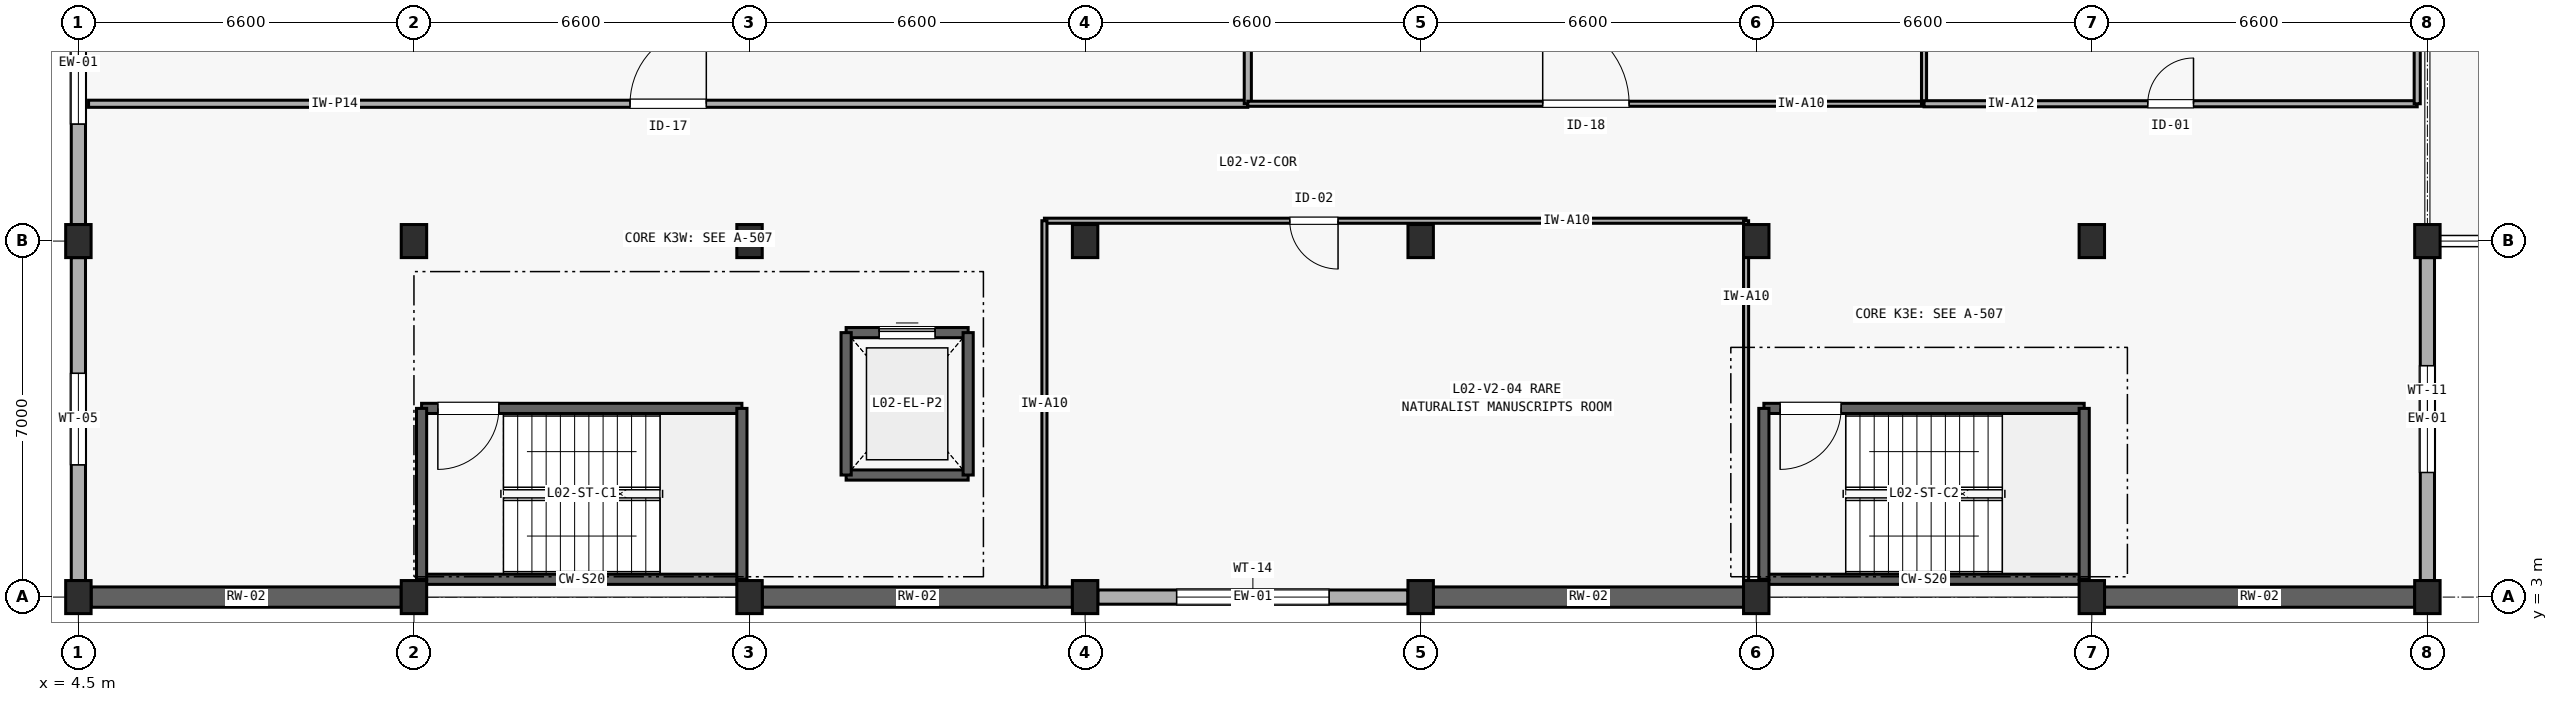
"""IFC4 building model, lengths in metres.
Left out: names, types, materials, properties, quantities, classifications, styles, units other than length and angle.
Written with IfcOpenShell. Run it as: python <this file> out.ifc"""

import sys

from ifc_helpers import new_model, si_unit, direction, frame, frame_2d, origin, origin_2d, place, context, subcontext, project, spatial, rectangle, extrude, element, fill, save


model = new_model("IFC4")
c1 = context("Model", 3, precision=1e-05, world=origin(), true_north=direction((0.0, 1.0)))
c2 = subcontext(c1, "Body", "Model", "MODEL_VIEW")
j1 = project(units=[si_unit("LENGTHUNIT", "METRE"), si_unit("PLANEANGLEUNIT", "RADIAN")], contexts=[c1])
p1 = place(None, origin())
s1 = spatial("IfcSite", under=j1, at=p1, CompositionType="ELEMENT")
p2 = place(p1, origin())
s2 = spatial("IfcBuilding", under=s1, at=p2, CompositionType="ELEMENT")
p3 = place(p2, frame((0.0, 0.0, 8.4)))
s3 = spatial("IfcBuildingStorey", under=s2, at=p3, CompositionType="ELEMENT", Elevation=8.4)
for number, where, z_axis, x_axis in (
    (1, (4.5, 3.0, 0.0), (0.0, 0.0, 1.0), (1.0, 0.0, 0.0)),
    (2, (4.5, 10.0, 0.0), (0.0, 0.0, 1.0), (1.0, 0.0, 0.0)),
    (3, (11.1, 3.0, 0.0), (0.0, 0.0, 1.0), (1.0, 0.0, 0.0)),
    (4, (11.1, 10.0, 0.0), (0.0, 0.0, 1.0), (1.0, 0.0, 0.0)),
    (5, (17.7, 3.0, 0.0), (0.0, 0.0, 1.0), (1.0, 0.0, 0.0)),
    (6, (17.7, 10.0, 0.0), (0.0, 0.0, 1.0), (1.0, 0.0, 0.0)),
    (7, (24.3, 3.0, 0.0), (0.0, 0.0, 1.0), (1.0, 0.0, 0.0)),
    (8, (24.3, 10.0, 0.0), (0.0, 0.0, 1.0), (1.0, 0.0, 0.0)),
    (9, (30.9, 3.0, 0.0), (0.0, 0.0, 1.0), (1.0, 0.0, 0.0)),
    (10, (30.9, 10.0, 0.0), (0.0, 0.0, 1.0), (1.0, 0.0, 0.0)),
    (11, (37.5, 3.0, 0.0), (0.0, 0.0, 1.0), (1.0, 0.0, 0.0)),
    (12, (37.5, 10.0, 0.0), (0.0, 0.0, 1.0), (1.0, 0.0, 0.0)),
    (13, (44.1, 3.0, 0.0), (0.0, 0.0, 1.0), (1.0, 0.0, 0.0)),
    (14, (44.1, 10.0, 0.0), (0.0, 0.0, 1.0), (1.0, 0.0, 0.0)),
    (15, (50.7, 3.0, 0.0), (0.0, 0.0, 1.0), (1.0, 0.0, 0.0)),
    (16, (50.7, 10.0, 0.0), (0.0, 0.0, 1.0), (1.0, 0.0, 0.0)),
):
    element("IfcColumn", number, at=place(p3, frame(where, z_axis=z_axis, x_axis=x_axis)), inside=s3, PredefinedType="COLUMN", context=c2, shape_type="SweptSolid", body=[
        extrude(rectangle(XDim=0.5, YDim=0.65, at=origin_2d()), origin(), (0.0, 0.0, 1.0), 4.2),
    ])
for number, where, z_axis, x_axis in (
    (17, (4.75, 3.0, 0.0), (0.0, 0.0, 1.0), (1.0, 0.0, 0.0)),
    (18, (17.95, 3.0, 0.0), (0.0, 0.0, 1.0), (1.0, 0.0, 0.0)),
):
    element("IfcWall", number, at=place(p3, frame(where, z_axis=z_axis, x_axis=x_axis)), inside=s3, PredefinedType="SHEAR", context=c2, shape_type="SweptSolid", body=[
        extrude(rectangle(XDim=6.1, YDim=0.4, at=frame_2d((3.05, 0.0))), origin(), (0.0, 0.0, 1.0), 3.85),
    ])
p4 = place(p3, frame((24.55, 3.0, 0.0), z_axis=(0.0, 0.0, 1.0), x_axis=(1.0, 0.0, 0.0)))
e19 = element("IfcWall", 19, at=p4, inside=s3, PredefinedType="SOLIDWALL", context=c2, shape_type="SweptSolid", body=[
    extrude(rectangle(XDim=6.1, YDim=0.28, at=frame_2d((3.05, 0.0))), origin(), (0.0, 0.0, 1.0), 3.365),
])
p5 = place(p4, frame((1.55, 0.0, 0.85)))
e20 = element("IfcOpeningElement", 20, at=p5, cuts=e19, PredefinedType="OPENING", context=c2, shape_type="SweptSolid", body=[
    extrude(rectangle(XDim=3.0, YDim=1.5, at=frame_2d((1.5, 0.75))), frame((0.0, 0.15, 0.0), z_axis=(0.0, -1.0, 0.0), x_axis=(1.0, 0.0, 0.0)), (0.0, 0.0, 1.0), 0.3),
])
p6 = place(p3, frame((31.15, 3.0, 0.0), z_axis=(0.0, 0.0, 1.0), x_axis=(1.0, 0.0, 0.0)))
e21 = element("IfcWall", 21, at=p6, inside=s3, PredefinedType="SHEAR", context=c2, shape_type="SweptSolid", body=[
    extrude(rectangle(XDim=6.1, YDim=0.4, at=frame_2d((3.05, 0.0))), origin(), (0.0, 0.0, 1.0), 3.85),
])
p7 = place(p3, frame((44.35, 3.0, 0.0), z_axis=(0.0, 0.0, 1.0), x_axis=(1.0, 0.0, 0.0)))
e22 = element("IfcWall", 22, at=p7, inside=s3, PredefinedType="SHEAR", context=c2, shape_type="SweptSolid", body=[
    extrude(rectangle(XDim=6.1, YDim=0.4, at=frame_2d((3.05, 0.0))), origin(), (0.0, 0.0, 1.0), 3.85),
])
p8 = place(p3, frame((4.5, 3.325, 0.0), z_axis=(0.0, 0.0, 1.0), x_axis=(0.0, 1.0, 0.0)))
e23 = element("IfcWall", 23, at=p8, inside=s3, PredefinedType="SOLIDWALL", context=c2, shape_type="SweptSolid", body=[
    extrude(rectangle(XDim=6.35, YDim=0.28, at=frame_2d((3.175, 0.0))), origin(), (0.0, 0.0, 1.0), 3.505),
])
p9 = place(p8, frame((2.275, 0.0, 0.85)))
e24 = element("IfcOpeningElement", 24, at=p9, cuts=e23, PredefinedType="OPENING", context=c2, shape_type="SweptSolid", body=[
    extrude(rectangle(XDim=1.8, YDim=1.35, at=frame_2d((0.9, 0.675))), frame((0.0, 0.15, 0.0), z_axis=(0.0, -1.0, 0.0), x_axis=(1.0, 0.0, 0.0)), (0.0, 0.0, 1.0), 0.3),
])
p10 = place(p3, frame((4.5, 10.325, 0.0), z_axis=(0.0, 0.0, 1.0), x_axis=(0.0, 1.0, 0.0)))
e25 = element("IfcWall", 25, at=p10, inside=s3, PredefinedType="SOLIDWALL", context=c2, shape_type="SweptSolid", body=[
    extrude(rectangle(XDim=6.35, YDim=0.28, at=frame_2d((3.175, 0.0))), origin(), (0.0, 0.0, 1.0), 3.505),
])
p11 = place(p10, frame((1.975, 0.0, 0.85)))
e26 = element("IfcOpeningElement", 26, at=p11, cuts=e25, PredefinedType="OPENING", context=c2, shape_type="SweptSolid", body=[
    extrude(rectangle(XDim=2.4, YDim=1.35, at=frame_2d((1.2, 0.675))), frame((0.0, 0.15, 0.0), z_axis=(0.0, -1.0, 0.0), x_axis=(1.0, 0.0, 0.0)), (0.0, 0.0, 1.0), 0.3),
])
p12 = place(p3, frame((50.7, 3.325, 0.0), z_axis=(0.0, 0.0, 1.0), x_axis=(0.0, 1.0, 0.0)))
e27 = element("IfcWall", 27, at=p12, inside=s3, PredefinedType="SOLIDWALL", context=c2, shape_type="SweptSolid", body=[
    extrude(rectangle(XDim=6.35, YDim=0.28, at=frame_2d((3.175, 0.0))), origin(), (0.0, 0.0, 1.0), 3.565),
])
p13 = place(p12, frame((2.125, 0.0, 0.85)))
e28 = element("IfcOpeningElement", 28, at=p13, cuts=e27, PredefinedType="OPENING", context=c2, shape_type="SweptSolid", body=[
    extrude(rectangle(XDim=2.1, YDim=1.5, at=frame_2d((1.05, 0.75))), frame((0.0, 0.15, 0.0), z_axis=(0.0, -1.0, 0.0), x_axis=(1.0, 0.0, 0.0)), (0.0, 0.0, 1.0), 0.3),
])
p14 = place(p3, frame((11.25, 3.35, 0.0), z_axis=(0.0, 0.0, 1.0), x_axis=(1.0, 0.0, 0.0)))
e29 = element("IfcWall", 29, at=p14, inside=s3, PredefinedType="SHEAR", context=c2, shape_type="SweptSolid", body=[
    extrude(rectangle(XDim=6.3, YDim=0.2, at=frame_2d((3.15, 0.0))), origin(), (0.0, 0.0, 1.0), 4.2),
])
p15 = place(p3, frame((11.25, 6.71, 0.0), z_axis=(0.0, 0.0, 1.0), x_axis=(1.0, 0.0, 0.0)))
e30 = element("IfcWall", 30, at=p15, inside=s3, PredefinedType="SHEAR", context=c2, shape_type="SweptSolid", body=[
    extrude(rectangle(XDim=6.3, YDim=0.2, at=frame_2d((3.15, 0.0))), origin(), (0.0, 0.0, 1.0), 4.2),
])
p16 = place(p15, frame((0.32, 0.0, 0.0)))
e31 = element("IfcOpeningElement", 31, at=p16, cuts=e30, PredefinedType="OPENING", context=c2, shape_type="SweptSolid", body=[
    extrude(rectangle(XDim=1.2, YDim=2.15, at=frame_2d((0.6, 1.075))), frame((0.0, 0.11, 0.0), z_axis=(0.0, -1.0, 0.0), x_axis=(1.0, 0.0, 0.0)), (0.0, 0.0, 1.0), 0.22),
])
for number, where, z_axis, x_axis in (
    (32, (11.25, 3.35, 0.0), (0.0, 0.0, 1.0), (0.0, 1.0, 0.0)),
    (33, (17.55, 3.35, 0.0), (0.0, 0.0, 1.0), (0.0, 1.0, 0.0)),
):
    element("IfcWall", number, at=place(p3, frame(where, z_axis=z_axis, x_axis=x_axis)), inside=s3, PredefinedType="SHEAR", context=c2, shape_type="SweptSolid", body=[
        extrude(rectangle(XDim=3.36, YDim=0.2, at=frame_2d((1.68, 0.0))), origin(), (0.0, 0.0, 1.0), 4.2),
    ])
p17 = place(p3, frame((37.65, 3.35, 0.0), z_axis=(0.0, 0.0, 1.0), x_axis=(1.0, 0.0, 0.0)))
e34 = element("IfcWall", 34, at=p17, inside=s3, PredefinedType="SHEAR", context=c2, shape_type="SweptSolid", body=[
    extrude(rectangle(XDim=6.3, YDim=0.2, at=frame_2d((3.15, 0.0))), origin(), (0.0, 0.0, 1.0), 4.2),
])
p18 = place(p3, frame((37.65, 6.71, 0.0), z_axis=(0.0, 0.0, 1.0), x_axis=(1.0, 0.0, 0.0)))
e35 = element("IfcWall", 35, at=p18, inside=s3, PredefinedType="SHEAR", context=c2, shape_type="SweptSolid", body=[
    extrude(rectangle(XDim=6.3, YDim=0.2, at=frame_2d((3.15, 0.0))), origin(), (0.0, 0.0, 1.0), 4.2),
])
p19 = place(p18, frame((0.32, 0.0, 0.0)))
e36 = element("IfcOpeningElement", 36, at=p19, cuts=e35, PredefinedType="OPENING", context=c2, shape_type="SweptSolid", body=[
    extrude(rectangle(XDim=1.2, YDim=2.15, at=frame_2d((0.6, 1.075))), frame((0.0, 0.11, 0.0), z_axis=(0.0, -1.0, 0.0), x_axis=(1.0, 0.0, 0.0)), (0.0, 0.0, 1.0), 0.22),
])
for number, where, z_axis, x_axis in (
    (37, (37.65, 3.35, 0.0), (0.0, 0.0, 1.0), (0.0, 1.0, 0.0)),
    (38, (43.95, 3.35, 0.0), (0.0, 0.0, 1.0), (0.0, 1.0, 0.0)),
):
    element("IfcWall", number, at=place(p3, frame(where, z_axis=z_axis, x_axis=x_axis)), inside=s3, PredefinedType="SHEAR", context=c2, shape_type="SweptSolid", body=[
        extrude(rectangle(XDim=3.36, YDim=0.2, at=frame_2d((1.68, 0.0))), origin(), (0.0, 0.0, 1.0), 4.2),
    ])
p20 = place(p3, frame((19.6, 5.4, 0.0), z_axis=(0.0, 0.0, 1.0), x_axis=(1.0, 0.0, 0.0)))
e39 = element("IfcWall", 39, at=p20, inside=s3, PredefinedType="SHEAR", context=c2, shape_type="SweptSolid", body=[
    extrude(rectangle(XDim=2.4, YDim=0.2, at=frame_2d((1.2, 0.0))), origin(), (0.0, 0.0, 1.0), 4.2),
])
p21 = place(p3, frame((19.6, 8.2, 0.0), z_axis=(0.0, 0.0, 1.0), x_axis=(1.0, 0.0, 0.0)))
e40 = element("IfcWall", 40, at=p21, inside=s3, PredefinedType="SHEAR", context=c2, shape_type="SweptSolid", body=[
    extrude(rectangle(XDim=2.4, YDim=0.2, at=frame_2d((1.2, 0.0))), origin(), (0.0, 0.0, 1.0), 4.2),
])
p22 = place(p21, frame((0.65, 0.0, 0.0)))
e41 = element("IfcOpeningElement", 41, at=p22, cuts=e40, PredefinedType="OPENING", context=c2, shape_type="SweptSolid", body=[
    extrude(rectangle(XDim=1.1, YDim=2.15, at=frame_2d((0.55, 1.075))), frame((0.0, 0.11, 0.0), z_axis=(0.0, -1.0, 0.0), x_axis=(1.0, 0.0, 0.0)), (0.0, 0.0, 1.0), 0.22),
])
for number, where, z_axis, x_axis in (
    (42, (19.6, 5.4, 0.0), (0.0, 0.0, 1.0), (0.0, 1.0, 0.0)),
    (43, (22.0, 5.4, 0.0), (0.0, 0.0, 1.0), (0.0, 1.0, 0.0)),
):
    element("IfcWall", number, at=place(p3, frame(where, z_axis=z_axis, x_axis=x_axis)), inside=s3, PredefinedType="SHEAR", context=c2, shape_type="SweptSolid", body=[
        extrude(rectangle(XDim=2.8, YDim=0.2, at=frame_2d((1.4, 0.0))), origin(), (0.0, 0.0, 1.0), 4.2),
    ])
p23 = place(p3, frame((4.7, 12.7, 0.0), z_axis=(0.0, 0.0, 1.0), x_axis=(1.0, 0.0, 0.0)))
e44 = element("IfcWall", 44, at=p23, inside=s3, PredefinedType="PLUMBINGWALL", context=c2, shape_type="SweptSolid", body=[
    extrude(rectangle(XDim=22.8, YDim=0.14, at=frame_2d((11.4, 0.0))), origin(), (0.0, 0.0, 1.0), 3.9),
])
p24 = place(p23, frame((10.65, 0.0, 0.0)))
e45 = element("IfcOpeningElement", 45, at=p24, cuts=e44, PredefinedType="OPENING", context=c2, shape_type="SweptSolid", body=[
    extrude(rectangle(XDim=1.5, YDim=2.15, at=frame_2d((0.75, 1.075))), frame((0.0, 0.08, 0.0), z_axis=(0.0, -1.0, 0.0), x_axis=(1.0, 0.0, 0.0)), (0.0, 0.0, 1.0), 0.16),
])
p25 = place(p3, frame((27.5, 12.7, 0.0), z_axis=(0.0, 0.0, 1.0), x_axis=(0.0, 1.0, 0.0)))
e46 = element("IfcWall", 46, at=p25, inside=s3, PredefinedType="PLUMBINGWALL", context=c2, shape_type="SweptSolid", body=[
    extrude(rectangle(XDim=11.1, YDim=0.14, at=frame_2d((5.55, 0.0))), origin(), (0.0, 0.0, 1.0), 3.521),
])
p26 = place(p3, frame((27.5, 12.7, 0.0), z_axis=(0.0, 0.0, 1.0), x_axis=(1.0, 0.0, 0.0)))
e47 = element("IfcWall", 47, at=p26, inside=s3, PredefinedType="PARTITIONING", context=c2, shape_type="SweptSolid", body=[
    extrude(rectangle(XDim=13.3, YDim=0.1, at=frame_2d((6.65, 0.0))), origin(), (0.0, 0.0, 1.0), 3.9),
])
p27 = place(p26, frame((5.8, 0.0, 0.0)))
e48 = element("IfcOpeningElement", 48, at=p27, cuts=e47, PredefinedType="OPENING", context=c2, shape_type="SweptSolid", body=[
    extrude(rectangle(XDim=1.7, YDim=2.2, at=frame_2d((0.85, 1.1))), frame((0.0, 0.06, 0.0), z_axis=(0.0, -1.0, 0.0), x_axis=(1.0, 0.0, 0.0)), (0.0, 0.0, 1.0), 0.12),
])
p28 = place(p3, frame((40.8, 12.7, 0.0), z_axis=(0.0, 0.0, 1.0), x_axis=(0.0, 1.0, 0.0)))
e49 = element("IfcWall", 49, at=p28, inside=s3, PredefinedType="PARTITIONING", context=c2, shape_type="SweptSolid", body=[
    extrude(rectangle(XDim=11.1, YDim=0.1, at=frame_2d((5.55, 0.0))), origin(), (0.0, 0.0, 1.0), 3.458),
])
p29 = place(p3, frame((40.8, 12.7, 0.0), z_axis=(0.0, 0.0, 1.0), x_axis=(1.0, 0.0, 0.0)))
e50 = element("IfcWall", 50, at=p29, inside=s3, PredefinedType="PARTITIONING", context=c2, shape_type="SweptSolid", body=[
    extrude(rectangle(XDim=9.7, YDim=0.12, at=frame_2d((4.85, 0.0))), origin(), (0.0, 0.0, 1.0), 3.9),
])
p30 = place(p29, frame((4.4, 0.0, 0.0)))
e51 = element("IfcOpeningElement", 51, at=p30, cuts=e50, PredefinedType="OPENING", context=c2, shape_type="SweptSolid", body=[
    extrude(rectangle(XDim=0.9, YDim=2.1, at=frame_2d((0.45, 1.05))), frame((0.0, 0.07, 0.0), z_axis=(0.0, -1.0, 0.0), x_axis=(1.0, 0.0, 0.0)), (0.0, 0.0, 1.0), 0.14),
])
p31 = place(p3, frame((50.5, 12.7, 0.0), z_axis=(0.0, 0.0, 1.0), x_axis=(0.0, 1.0, 0.0)))
e52 = element("IfcWall", 52, at=p31, inside=s3, PredefinedType="PARTITIONING", context=c2, shape_type="SweptSolid", body=[
    extrude(rectangle(XDim=11.1, YDim=0.12, at=frame_2d((5.55, 0.0))), origin(), (0.0, 0.0, 1.0), 3.485),
])
p32 = place(p3, frame((23.5, 10.4, 0.0), z_axis=(0.0, 0.0, 1.0), x_axis=(1.0, 0.0, 0.0)))
e53 = element("IfcWall", 53, at=p32, inside=s3, PredefinedType="PARTITIONING", context=c2, shape_type="SweptSolid", body=[
    extrude(rectangle(XDim=13.8, YDim=0.1, at=frame_2d((6.9, 0.0))), origin(), (0.0, 0.0, 1.0), 3.9),
])
p33 = place(p32, frame((4.825, 0.0, 0.0)))
e54 = element("IfcOpeningElement", 54, at=p33, cuts=e53, PredefinedType="OPENING", context=c2, shape_type="SweptSolid", body=[
    extrude(rectangle(XDim=0.95, YDim=2.1, at=frame_2d((0.475, 1.05))), frame((0.0, 0.06, 0.0), z_axis=(0.0, -1.0, 0.0), x_axis=(1.0, 0.0, 0.0)), (0.0, 0.0, 1.0), 0.12),
])
for number, where, z_axis, x_axis in (
    (55, (23.5, 3.2, 0.0), (0.0, 0.0, 1.0), (0.0, 1.0, 0.0)),
    (56, (37.3, 3.2, 0.0), (0.0, 0.0, 1.0), (0.0, 1.0, 0.0)),
):
    element("IfcWall", number, at=place(p3, frame(where, z_axis=z_axis, x_axis=x_axis)), inside=s3, PredefinedType="PARTITIONING", context=c2, shape_type="SweptSolid", body=[
        extrude(rectangle(XDim=7.2, YDim=0.1, at=frame_2d((3.6, 0.0))), origin(), (0.0, 0.0, 1.0), 3.9),
    ])
p34 = place(p5, origin())
e57 = element("IfcWindow", 57, at=p34, inside=s3, PartitioningType="SINGLE_PANEL", PredefinedType="WINDOW", context=c2, shape_type="SweptSolid", body=[
    extrude(rectangle(XDim=3.0, YDim=1.5, at=frame_2d((1.5, 0.75))), frame((0.0, 0.03, 0.0), z_axis=(0.0, -1.0, 0.0), x_axis=(1.0, 0.0, 0.0)), (0.0, 0.0, 1.0), 0.06),
])
fill(e20, e57)
p35 = place(p9, origin())
e58 = element("IfcWindow", 58, at=p35, inside=s3, PartitioningType="SINGLE_PANEL", PredefinedType="WINDOW", context=c2, shape_type="SweptSolid", body=[
    extrude(rectangle(XDim=1.8, YDim=1.35, at=frame_2d((0.9, 0.675))), frame((0.0, 0.03, 0.0), z_axis=(0.0, -1.0, 0.0), x_axis=(1.0, 0.0, 0.0)), (0.0, 0.0, 1.0), 0.06),
])
fill(e24, e58)
p36 = place(p11, origin())
e59 = element("IfcWindow", 59, at=p36, inside=s3, PartitioningType="SINGLE_PANEL", PredefinedType="WINDOW", context=c2, shape_type="SweptSolid", body=[
    extrude(rectangle(XDim=2.4, YDim=1.35, at=frame_2d((1.2, 0.675))), frame((0.0, 0.03, 0.0), z_axis=(0.0, -1.0, 0.0), x_axis=(1.0, 0.0, 0.0)), (0.0, 0.0, 1.0), 0.06),
])
fill(e26, e59)
p37 = place(p13, origin())
e60 = element("IfcWindow", 60, at=p37, inside=s3, PartitioningType="SINGLE_PANEL", PredefinedType="WINDOW", context=c2, shape_type="SweptSolid", body=[
    extrude(rectangle(XDim=2.1, YDim=1.5, at=frame_2d((1.05, 0.75))), frame((0.0, 0.03, 0.0), z_axis=(0.0, -1.0, 0.0), x_axis=(1.0, 0.0, 0.0)), (0.0, 0.0, 1.0), 0.06),
])
fill(e28, e60)
p38 = place(p16, frame((1.2, 0.0, 0.0), z_axis=(0.0, 0.0, 1.0), x_axis=(-1.0, 0.0, 0.0)))
e61 = element("IfcDoor", 61, at=p38, inside=s3, OperationType="SINGLE_SWING_RIGHT", PredefinedType="DOOR", context=c2, shape_type="SweptSolid", body=[
    extrude(rectangle(XDim=1.2, YDim=2.15, at=frame_2d((0.6, 1.075))), frame((0.0, 0.025, 0.0), z_axis=(0.0, -1.0, 0.0), x_axis=(1.0, 0.0, 0.0)), (0.0, 0.0, 1.0), 0.05),
])
fill(e31, e61)
p39 = place(p19, frame((1.2, 0.0, 0.0), z_axis=(0.0, 0.0, 1.0), x_axis=(-1.0, 0.0, 0.0)))
e62 = element("IfcDoor", 62, at=p39, inside=s3, OperationType="SINGLE_SWING_RIGHT", PredefinedType="DOOR", context=c2, shape_type="SweptSolid", body=[
    extrude(rectangle(XDim=1.2, YDim=2.15, at=frame_2d((0.6, 1.075))), frame((0.0, 0.025, 0.0), z_axis=(0.0, -1.0, 0.0), x_axis=(1.0, 0.0, 0.0)), (0.0, 0.0, 1.0), 0.05),
])
fill(e36, e62)
p40 = place(p22, origin())
e63 = element("IfcDoor", 63, at=p40, inside=s3, OperationType="SLIDING_TO_LEFT", PredefinedType="DOOR", context=c2, shape_type="SweptSolid", body=[
    extrude(rectangle(XDim=1.1, YDim=2.15, at=frame_2d((0.55, 1.075))), frame((0.0, 0.025, 0.0), z_axis=(0.0, -1.0, 0.0), x_axis=(1.0, 0.0, 0.0)), (0.0, 0.0, 1.0), 0.05),
])
fill(e41, e63)
p41 = place(p24, origin())
e64 = element("IfcDoor", 64, at=p41, inside=s3, OperationType="SINGLE_SWING_RIGHT", PredefinedType="DOOR", context=c2, shape_type="SweptSolid", body=[
    extrude(rectangle(XDim=1.5, YDim=2.15, at=frame_2d((0.75, 1.075))), frame((0.0, 0.025, 0.0), z_axis=(0.0, -1.0, 0.0), x_axis=(1.0, 0.0, 0.0)), (0.0, 0.0, 1.0), 0.05),
])
fill(e45, e64)
p42 = place(p27, origin())
e65 = element("IfcDoor", 65, at=p42, inside=s3, OperationType="SINGLE_SWING_LEFT", PredefinedType="DOOR", context=c2, shape_type="SweptSolid", body=[
    extrude(rectangle(XDim=1.7, YDim=2.2, at=frame_2d((0.85, 1.1))), frame((0.0, 0.025, 0.0), z_axis=(0.0, -1.0, 0.0), x_axis=(1.0, 0.0, 0.0)), (0.0, 0.0, 1.0), 0.05),
])
fill(e48, e65)
p43 = place(p30, origin())
e66 = element("IfcDoor", 66, at=p43, inside=s3, OperationType="SINGLE_SWING_RIGHT", PredefinedType="DOOR", context=c2, shape_type="SweptSolid", body=[
    extrude(rectangle(XDim=0.9, YDim=2.1, at=frame_2d((0.45, 1.05))), frame((0.0, 0.025, 0.0), z_axis=(0.0, -1.0, 0.0), x_axis=(1.0, 0.0, 0.0)), (0.0, 0.0, 1.0), 0.05),
])
fill(e51, e66)
p44 = place(p33, frame((0.95, 0.0, 0.0), z_axis=(0.0, 0.0, 1.0), x_axis=(-1.0, 0.0, 0.0)))
e67 = element("IfcDoor", 67, at=p44, inside=s3, OperationType="SINGLE_SWING_LEFT", PredefinedType="DOOR", context=c2, shape_type="SweptSolid", body=[
    extrude(rectangle(XDim=0.95, YDim=2.1, at=frame_2d((0.475, 1.05))), frame((0.0, 0.025, 0.0), z_axis=(0.0, -1.0, 0.0), x_axis=(1.0, 0.0, 0.0)), (0.0, 0.0, 1.0), 0.05),
])
fill(e54, e67)
save(model, sys.argv[1])
